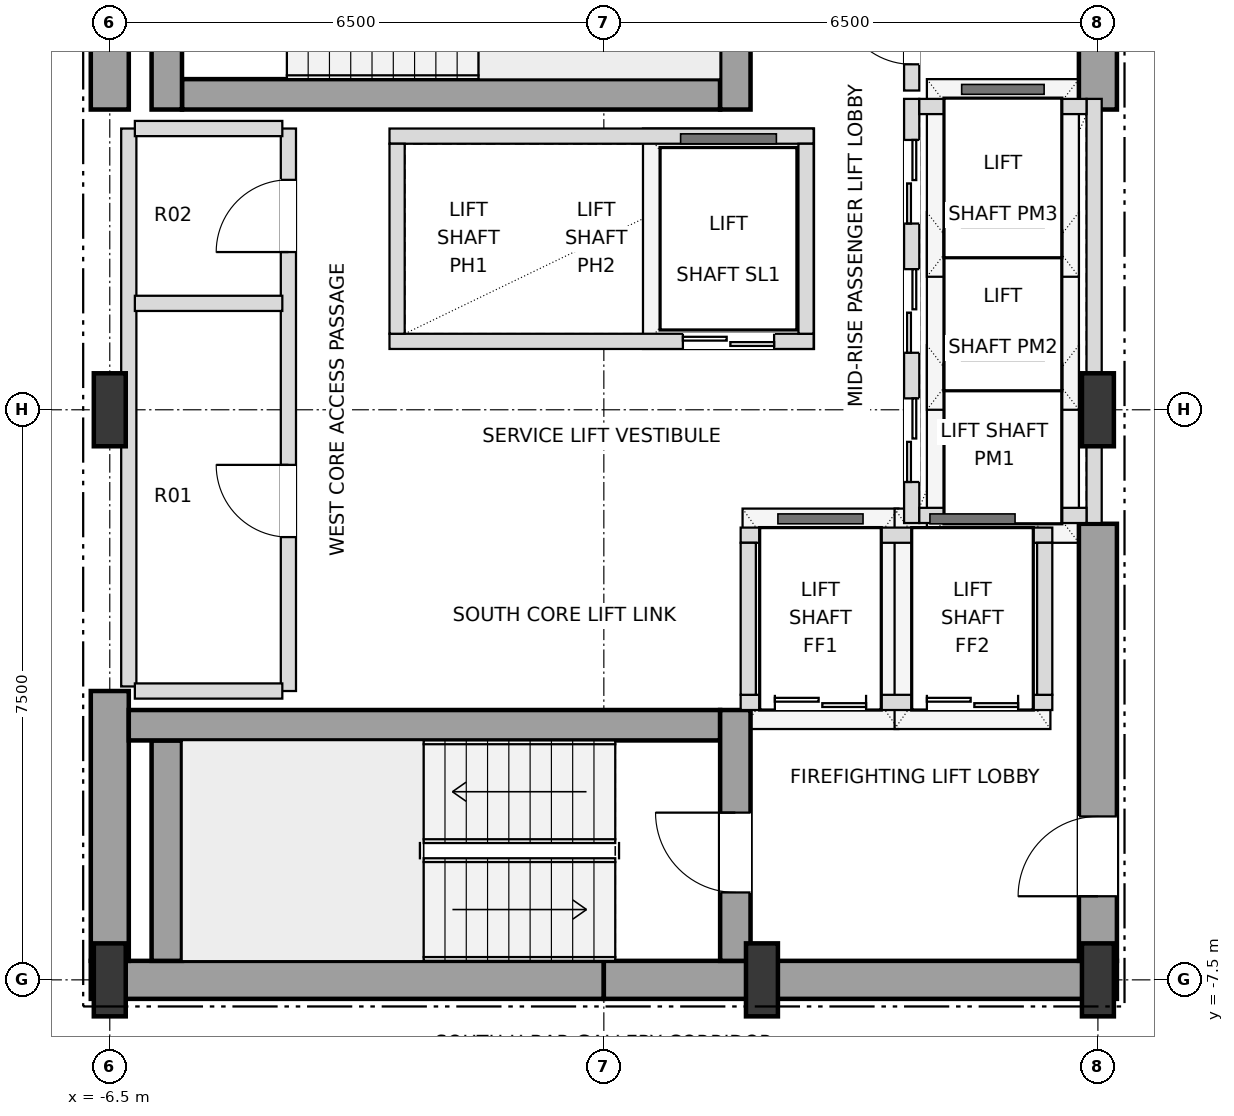
"""IFC4 building model, lengths in metres.
Left out: names, types, materials, properties, quantities, classifications, styles, units other than length and angle.
Written with IfcOpenShell. Run it as: python <this file> out.ifc"""

import sys

from ifc_helpers import new_model, si_unit, direction, frame, frame_2d, origin, origin_2d, place, context, subcontext, project, spatial, rectangle, i_section, extrude, element, fill, save


model = new_model("IFC4")
c1 = context("Model", 3, precision=1e-05, world=origin(), true_north=direction((0.0, 1.0)))
c2 = subcontext(c1, "Body", "Model", "MODEL_VIEW")
j1 = project(units=[si_unit("LENGTHUNIT", "METRE"), si_unit("PLANEANGLEUNIT", "RADIAN")], contexts=[c1])
p1 = place(None, origin())
s1 = spatial("IfcSite", under=j1, at=p1, CompositionType="ELEMENT")
p2 = place(p1, origin())
s2 = spatial("IfcBuilding", under=s1, at=p2, CompositionType="ELEMENT")
p3 = place(p2, frame((0.0, 0.0, 158.4)))
s3 = spatial("IfcBuildingStorey", under=s2, at=p3, CompositionType="ELEMENT", Elevation=158.4)
for number, where, z_axis, x_axis in (
    (1, (-6.5, -7.5, 0.0), (0.0, 0.0, 1.0), (1.0, 0.0, 0.0)),
    (2, (2.08, -7.5, 0.0), (0.0, 0.0, 1.0), (1.0, 0.0, 0.0)),
    (3, (6.5, -7.5, 0.0), (0.0, 0.0, 1.0), (1.0, 0.0, 0.0)),
    (4, (-6.5, 0.0, 0.0), (0.0, 0.0, 1.0), (1.0, 0.0, 0.0)),
    (5, (6.5, 0.0, 0.0), (0.0, 0.0, 1.0), (1.0, 0.0, 0.0)),
):
    element("IfcColumn", number, at=place(p3, frame(where, z_axis=z_axis, x_axis=x_axis)), inside=s3, PredefinedType="COLUMN", context=c2, shape_type="SweptSolid", body=[
        extrude(i_section(OverallWidth=0.42, OverallDepth=0.96, WebThickness=0.022, FlangeThickness=0.034, at=origin_2d()), origin(), (0.0, 0.0, 1.0), 3.6),
    ])
for number, where, z_axis, x_axis in (
    (6, (-6.75, -7.5, 0.0), (0.0, 0.0, 1.0), (1.0, 0.0, 0.0)),
    (7, (0.0, -7.5, 0.0), (0.0, 0.0, 1.0), (1.0, 0.0, 0.0)),
):
    element("IfcWall", number, at=place(p3, frame(where, z_axis=z_axis, x_axis=x_axis)), inside=s3, PredefinedType="SHEAR", context=c2, shape_type="SweptSolid", body=[
        extrude(rectangle(XDim=6.75, YDim=0.5, at=frame_2d((3.375, 0.0))), origin(), (0.0, 0.0, 1.0), 3.38),
    ])
p4 = place(p3, frame((-6.5, -7.25, 0.0), z_axis=(0.0, 0.0, 1.0), x_axis=(0.0, 1.0, 0.0)))
e8 = element("IfcWall", 8, at=p4, inside=s3, PredefinedType="SHEAR", context=c2, shape_type="SweptSolid", body=[
    extrude(rectangle(XDim=3.55, YDim=0.5, at=frame_2d((1.775, 0.0))), origin(), (0.0, 0.0, 1.0), 3.38),
])
p5 = place(p3, frame((-6.5, 3.95, 0.0), z_axis=(0.0, 0.0, 1.0), x_axis=(0.0, 1.0, 0.0)))
e9 = element("IfcWall", 9, at=p5, inside=s3, PredefinedType="SHEAR", context=c2, shape_type="SweptSolid", body=[
    extrude(rectangle(XDim=3.3, YDim=0.5, at=frame_2d((1.65, 0.0))), origin(), (0.0, 0.0, 1.0), 3.38),
])
p6 = place(p3, frame((6.5, -7.25, 0.0), z_axis=(0.0, 0.0, 1.0), x_axis=(0.0, 1.0, 0.0)))
e10 = element("IfcWall", 10, at=p6, inside=s3, PredefinedType="SHEAR", context=c2, shape_type="SweptSolid", body=[
    extrude(rectangle(XDim=5.75, YDim=0.5, at=frame_2d((2.875, 0.0))), origin(), (0.0, 0.0, 1.0), 3.38),
])
p7 = place(p6, frame((0.85, 0.0, 0.0)))
e11 = element("IfcOpeningElement", 11, at=p7, cuts=e10, PredefinedType="OPENING", context=c2, shape_type="SweptSolid", body=[
    extrude(rectangle(XDim=1.05, YDim=2.15, at=frame_2d((0.525, 1.075))), frame((0.0, 0.26, 0.0), z_axis=(0.0, -1.0, 0.0), x_axis=(1.0, 0.0, 0.0)), (0.0, 0.0, 1.0), 0.52),
])
p8 = place(p3, frame((6.5, 3.95, 0.0), z_axis=(0.0, 0.0, 1.0), x_axis=(0.0, 1.0, 0.0)))
e12 = element("IfcWall", 12, at=p8, inside=s3, PredefinedType="SHEAR", context=c2, shape_type="SweptSolid", body=[
    extrude(rectangle(XDim=3.3, YDim=0.5, at=frame_2d((1.65, 0.0))), origin(), (0.0, 0.0, 1.0), 3.38),
])
p9 = place(p3, frame((-5.75, -7.25, 0.0), z_axis=(0.0, 0.0, 1.0), x_axis=(0.0, 1.0, 0.0)))
e13 = element("IfcWall", 13, at=p9, inside=s3, PredefinedType="SHEAR", context=c2, shape_type="SweptSolid", body=[
    extrude(rectangle(XDim=2.9, YDim=0.4, at=frame_2d((1.45, 0.0))), origin(), (0.0, 0.0, 1.0), 3.38),
])
p10 = place(p3, frame((-6.25, -4.15, 0.0), z_axis=(0.0, 0.0, 1.0), x_axis=(1.0, 0.0, 0.0)))
e14 = element("IfcWall", 14, at=p10, inside=s3, PredefinedType="SHEAR", context=c2, shape_type="SweptSolid", body=[
    extrude(rectangle(XDim=7.78, YDim=0.4, at=frame_2d((3.89, 0.0))), origin(), (0.0, 0.0, 1.0), 3.38),
])
p11 = place(p3, frame((1.73, -7.25, 0.0), z_axis=(0.0, 0.0, 1.0), x_axis=(0.0, 1.0, 0.0)))
e15 = element("IfcWall", 15, at=p11, inside=s3, PredefinedType="SHEAR", context=c2, shape_type="SweptSolid", body=[
    extrude(rectangle(XDim=3.3, YDim=0.4, at=frame_2d((1.65, 0.0))), origin(), (0.0, 0.0, 1.0), 3.38),
])
p12 = place(p11, frame((0.9, 0.0, 0.0)))
e16 = element("IfcOpeningElement", 16, at=p12, cuts=e15, PredefinedType="OPENING", context=c2, shape_type="SweptSolid", body=[
    extrude(rectangle(XDim=1.05, YDim=2.15, at=frame_2d((0.525, 1.075))), frame((0.0, 0.21, 0.0), z_axis=(0.0, -1.0, 0.0), x_axis=(1.0, 0.0, 0.0)), (0.0, 0.0, 1.0), 0.42),
])
p13 = place(p3, frame((-5.55, 4.15, 0.0), z_axis=(0.0, 0.0, 1.0), x_axis=(1.0, 0.0, 0.0)))
e17 = element("IfcWall", 17, at=p13, inside=s3, PredefinedType="SHEAR", context=c2, shape_type="SweptSolid", body=[
    extrude(rectangle(XDim=7.08, YDim=0.4, at=frame_2d((3.54, 0.0))), origin(), (0.0, 0.0, 1.0), 3.38),
])
for number, where, z_axis, x_axis in (
    (18, (1.73, 3.95, 0.0), (0.0, 0.0, 1.0), (0.0, 1.0, 0.0)),
    (19, (-5.75, 3.95, 0.0), (0.0, 0.0, 1.0), (0.0, 1.0, 0.0)),
):
    element("IfcWall", number, at=place(p3, frame(where, z_axis=z_axis, x_axis=x_axis)), inside=s3, PredefinedType="SHEAR", context=c2, shape_type="SweptSolid", body=[
        extrude(rectangle(XDim=3.3, YDim=0.4, at=frame_2d((1.65, 0.0))), origin(), (0.0, 0.0, 1.0), 3.38),
    ])
p14 = place(p3, frame((4.05, -1.49, 0.0), z_axis=(0.0, 0.0, 1.0), x_axis=(0.0, 1.0, 0.0)))
e20 = element("IfcWall", 20, at=p14, inside=s3, PredefinedType="SOLIDWALL", context=c2, shape_type="SweptSolid", body=[
    extrude(rectangle(XDim=5.58, YDim=0.2, at=frame_2d((2.79, 0.0))), origin(), (0.0, 0.0, 1.0), 3.38),
])
p15 = place(p14, frame((0.54, 0.0, 0.0)))
e21 = element("IfcOpeningElement", 21, at=p15, cuts=e20, PredefinedType="OPENING", context=c2, shape_type="SweptSolid", body=[
    extrude(rectangle(XDim=1.1, YDim=2.15, at=frame_2d((0.55, 1.075))), frame((0.0, 0.11, 0.0), z_axis=(0.0, -1.0, 0.0), x_axis=(1.0, 0.0, 0.0)), (0.0, 0.0, 1.0), 0.22),
])
p16 = place(p14, frame((2.24, 0.0, 0.0)))
e22 = element("IfcOpeningElement", 22, at=p16, cuts=e20, PredefinedType="OPENING", context=c2, shape_type="SweptSolid", body=[
    extrude(rectangle(XDim=1.1, YDim=2.15, at=frame_2d((0.55, 1.075))), frame((0.0, 0.11, 0.0), z_axis=(0.0, -1.0, 0.0), x_axis=(1.0, 0.0, 0.0)), (0.0, 0.0, 1.0), 0.22),
])
p17 = place(p14, frame((3.94, 0.0, 0.0)))
e23 = element("IfcOpeningElement", 23, at=p17, cuts=e20, PredefinedType="OPENING", context=c2, shape_type="SweptSolid", body=[
    extrude(rectangle(XDim=1.1, YDim=2.15, at=frame_2d((0.55, 1.075))), frame((0.0, 0.11, 0.0), z_axis=(0.0, -1.0, 0.0), x_axis=(1.0, 0.0, 0.0)), (0.0, 0.0, 1.0), 0.22),
])
p18 = place(p3, frame((6.45, -1.49, 0.0), z_axis=(0.0, 0.0, 1.0), x_axis=(0.0, 1.0, 0.0)))
e24 = element("IfcWall", 24, at=p18, inside=s3, PredefinedType="SOLIDWALL", context=c2, shape_type="SweptSolid", body=[
    extrude(rectangle(XDim=5.58, YDim=0.2, at=frame_2d((2.79, 0.0))), origin(), (0.0, 0.0, 1.0), 2.816),
])
for number, where, z_axis, x_axis in (
    (25, (4.15, -1.39, 0.0), (0.0, 0.0, 1.0), (1.0, 0.0, 0.0)),
    (26, (4.15, 3.99, 0.0), (0.0, 0.0, 1.0), (1.0, 0.0, 0.0)),
):
    element("IfcWall", number, at=place(p3, frame(where, z_axis=z_axis, x_axis=x_axis)), inside=s3, PredefinedType="SOLIDWALL", context=c2, shape_type="SweptSolid", body=[
        extrude(rectangle(XDim=2.2, YDim=0.2, at=frame_2d((1.1, 0.0))), origin(), (0.0, 0.0, 1.0), 3.38),
    ])
p19 = place(p3, frame((-2.82, 0.9, 0.0), z_axis=(0.0, 0.0, 1.0), x_axis=(1.0, 0.0, 0.0)))
e27 = element("IfcWall", 27, at=p19, inside=s3, PredefinedType="SOLIDWALL", context=c2, shape_type="SweptSolid", body=[
    extrude(rectangle(XDim=5.58, YDim=0.2, at=frame_2d((2.79, 0.0))), origin(), (0.0, 0.0, 1.0), 3.38),
])
p20 = place(p19, frame((3.86, 0.0, 0.0)))
e28 = element("IfcOpeningElement", 28, at=p20, cuts=e27, PredefinedType="OPENING", context=c2, shape_type="SweptSolid", body=[
    extrude(rectangle(XDim=1.2, YDim=2.2, at=frame_2d((0.6, 1.1))), frame((0.0, 0.11, 0.0), z_axis=(0.0, -1.0, 0.0), x_axis=(1.0, 0.0, 0.0)), (0.0, 0.0, 1.0), 0.22),
])
p21 = place(p3, frame((-2.82, 3.6, 0.0), z_axis=(0.0, 0.0, 1.0), x_axis=(1.0, 0.0, 0.0)))
e29 = element("IfcWall", 29, at=p21, inside=s3, PredefinedType="SOLIDWALL", context=c2, shape_type="SweptSolid", body=[
    extrude(rectangle(XDim=5.58, YDim=0.2, at=frame_2d((2.79, 0.0))), origin(), (0.0, 0.0, 1.0), 3.38),
])
for number, where, z_axis, x_axis in (
    (30, (-2.72, 1.0, 0.0), (0.0, 0.0, 1.0), (0.0, 1.0, 0.0)),
    (31, (2.66, 1.0, 0.0), (0.0, 0.0, 1.0), (0.0, 1.0, 0.0)),
):
    element("IfcWall", number, at=place(p3, frame(where, z_axis=z_axis, x_axis=x_axis)), inside=s3, PredefinedType="SOLIDWALL", context=c2, shape_type="SweptSolid", body=[
        extrude(rectangle(XDim=2.5, YDim=0.2, at=frame_2d((1.25, 0.0))), origin(), (0.0, 0.0, 1.0), 3.38),
    ])
p22 = place(p3, frame((1.8, -3.85, 0.0), z_axis=(0.0, 0.0, 1.0), x_axis=(1.0, 0.0, 0.0)))
e32 = element("IfcWall", 32, at=p22, inside=s3, PredefinedType="SOLIDWALL", context=c2, shape_type="SweptSolid", body=[
    extrude(rectangle(XDim=4.1, YDim=0.2, at=frame_2d((2.05, 0.0))), origin(), (0.0, 0.0, 1.0), 3.38),
])
p23 = place(p22, frame((0.45, 0.0, 0.0)))
e33 = element("IfcOpeningElement", 33, at=p23, cuts=e32, PredefinedType="OPENING", context=c2, shape_type="SweptSolid", body=[
    extrude(rectangle(XDim=1.2, YDim=2.2, at=frame_2d((0.6, 1.1))), frame((0.0, 0.11, 0.0), z_axis=(0.0, -1.0, 0.0), x_axis=(1.0, 0.0, 0.0)), (0.0, 0.0, 1.0), 0.22),
])
p24 = place(p22, frame((2.45, 0.0, 0.0)))
e34 = element("IfcOpeningElement", 34, at=p24, cuts=e32, PredefinedType="OPENING", context=c2, shape_type="SweptSolid", body=[
    extrude(rectangle(XDim=1.2, YDim=2.2, at=frame_2d((0.6, 1.1))), frame((0.0, 0.11, 0.0), z_axis=(0.0, -1.0, 0.0), x_axis=(1.0, 0.0, 0.0)), (0.0, 0.0, 1.0), 0.22),
])
p25 = place(p3, frame((1.8, -1.65, 0.0), z_axis=(0.0, 0.0, 1.0), x_axis=(1.0, 0.0, 0.0)))
e35 = element("IfcWall", 35, at=p25, inside=s3, PredefinedType="SOLIDWALL", context=c2, shape_type="SweptSolid", body=[
    extrude(rectangle(XDim=4.1, YDim=0.2, at=frame_2d((2.05, 0.0))), origin(), (0.0, 0.0, 1.0), 3.38),
])
for number, where, z_axis, x_axis in (
    (36, (1.9, -3.75, 0.0), (0.0, 0.0, 1.0), (0.0, 1.0, 0.0)),
    (37, (5.8, -3.75, 0.0), (0.0, 0.0, 1.0), (0.0, 1.0, 0.0)),
):
    element("IfcWall", number, at=place(p3, frame(where, z_axis=z_axis, x_axis=x_axis)), inside=s3, PredefinedType="SOLIDWALL", context=c2, shape_type="SweptSolid", body=[
        extrude(rectangle(XDim=2.0, YDim=0.2, at=frame_2d((1.0, 0.0))), origin(), (0.0, 0.0, 1.0), 3.38),
    ])
p26 = place(p3, frame((-6.25, -3.64, 0.0), z_axis=(0.0, 0.0, 1.0), x_axis=(0.0, 1.0, 0.0)))
e38 = element("IfcWall", 38, at=p26, inside=s3, PredefinedType="SOLIDWALL", context=c2, shape_type="SweptSolid", body=[
    extrude(rectangle(XDim=7.34, YDim=0.2, at=frame_2d((3.67, 0.0))), origin(), (0.0, 0.0, 1.0), 3.38),
])
p27 = place(p3, frame((-4.15, -3.7, 0.0), z_axis=(0.0, 0.0, 1.0), x_axis=(0.0, 1.0, 0.0)))
e39 = element("IfcWall", 39, at=p27, inside=s3, PredefinedType="SOLIDWALL", context=c2, shape_type="SweptSolid", body=[
    extrude(rectangle(XDim=7.4, YDim=0.2, at=frame_2d((3.7, 0.0))), origin(), (0.0, 0.0, 1.0), 3.38),
])
p28 = place(p27, frame((2.025, 0.0, 0.0)))
e40 = element("IfcOpeningElement", 40, at=p28, cuts=e39, PredefinedType="OPENING", context=c2, shape_type="SweptSolid", body=[
    extrude(rectangle(XDim=0.95, YDim=2.15, at=frame_2d((0.475, 1.075))), frame((0.0, 0.11, 0.0), z_axis=(0.0, -1.0, 0.0), x_axis=(1.0, 0.0, 0.0)), (0.0, 0.0, 1.0), 0.22),
])
p29 = place(p27, frame((5.775, 0.0, 0.0)))
e41 = element("IfcOpeningElement", 41, at=p29, cuts=e39, PredefinedType="OPENING", context=c2, shape_type="SweptSolid", body=[
    extrude(rectangle(XDim=0.95, YDim=2.15, at=frame_2d((0.475, 1.075))), frame((0.0, 0.11, 0.0), z_axis=(0.0, -1.0, 0.0), x_axis=(1.0, 0.0, 0.0)), (0.0, 0.0, 1.0), 0.22),
])
p30 = place(p3, frame((4.05, 4.2, 0.0), z_axis=(0.0, 0.0, 1.0), x_axis=(0.0, 1.0, 0.0)))
e42 = element("IfcWall", 42, at=p30, inside=s3, PredefinedType="SOLIDWALL", context=c2, shape_type="SweptSolid", body=[
    extrude(rectangle(XDim=1.65, YDim=0.2, at=frame_2d((0.825, 0.0))), origin(), (0.0, 0.0, 1.0), 3.38),
])
p31 = place(p30, frame((0.345, 0.0, 0.0)))
e43 = element("IfcOpeningElement", 43, at=p31, cuts=e42, PredefinedType="OPENING", context=c2, shape_type="SweptSolid", body=[
    extrude(rectangle(XDim=0.95, YDim=2.15, at=frame_2d((0.475, 1.075))), frame((0.0, 0.11, 0.0), z_axis=(0.0, -1.0, 0.0), x_axis=(1.0, 0.0, 0.0)), (0.0, 0.0, 1.0), 0.22),
])
for number, where, z_axis, x_axis in (
    (44, (-6.17, -3.7, 0.0), (0.0, 0.0, 1.0), (1.0, 0.0, 0.0)),
    (45, (-6.17, 1.4, 0.0), (0.0, 0.0, 1.0), (1.0, 0.0, 0.0)),
    (46, (-6.17, 3.7, 0.0), (0.0, 0.0, 1.0), (1.0, 0.0, 0.0)),
):
    element("IfcWall", number, at=place(p3, frame(where, z_axis=z_axis, x_axis=x_axis)), inside=s3, PredefinedType="SOLIDWALL", context=c2, shape_type="SweptSolid", body=[
        extrude(rectangle(XDim=1.94, YDim=0.2, at=frame_2d((0.97, 0.0))), origin(), (0.0, 0.0, 1.0), 3.38),
    ])
p32 = place(p7, origin())
e47 = element("IfcDoor", 47, at=p32, inside=s3, OperationType="SINGLE_SWING_LEFT", PredefinedType="DOOR", context=c2, shape_type="SweptSolid", body=[
    extrude(rectangle(XDim=1.05, YDim=2.15, at=frame_2d((0.525, 1.075))), frame((0.0, 0.025, 0.0), z_axis=(0.0, -1.0, 0.0), x_axis=(1.0, 0.0, 0.0)), (0.0, 0.0, 1.0), 0.05),
])
fill(e11, e47)
p33 = place(p12, origin())
e48 = element("IfcDoor", 48, at=p33, inside=s3, OperationType="SINGLE_SWING_RIGHT", PredefinedType="DOOR", context=c2, shape_type="SweptSolid", body=[
    extrude(rectangle(XDim=1.05, YDim=2.15, at=frame_2d((0.525, 1.075))), frame((0.0, 0.025, 0.0), z_axis=(0.0, -1.0, 0.0), x_axis=(1.0, 0.0, 0.0)), (0.0, 0.0, 1.0), 0.05),
])
fill(e16, e48)
p34 = place(p15, origin())
e49 = element("IfcDoor", 49, at=p34, inside=s3, OperationType="DOUBLE_DOOR_SLIDING", PredefinedType="DOOR", context=c2, shape_type="SweptSolid", body=[
    extrude(rectangle(XDim=1.1, YDim=2.15, at=frame_2d((0.55, 1.075))), frame((0.0, 0.025, 0.0), z_axis=(0.0, -1.0, 0.0), x_axis=(1.0, 0.0, 0.0)), (0.0, 0.0, 1.0), 0.05),
])
fill(e21, e49)
p35 = place(p16, origin())
e50 = element("IfcDoor", 50, at=p35, inside=s3, OperationType="DOUBLE_DOOR_SLIDING", PredefinedType="DOOR", context=c2, shape_type="SweptSolid", body=[
    extrude(rectangle(XDim=1.1, YDim=2.15, at=frame_2d((0.55, 1.075))), frame((0.0, 0.025, 0.0), z_axis=(0.0, -1.0, 0.0), x_axis=(1.0, 0.0, 0.0)), (0.0, 0.0, 1.0), 0.05),
])
fill(e22, e50)
p36 = place(p17, origin())
e51 = element("IfcDoor", 51, at=p36, inside=s3, OperationType="DOUBLE_DOOR_SLIDING", PredefinedType="DOOR", context=c2, shape_type="SweptSolid", body=[
    extrude(rectangle(XDim=1.1, YDim=2.15, at=frame_2d((0.55, 1.075))), frame((0.0, 0.025, 0.0), z_axis=(0.0, -1.0, 0.0), x_axis=(1.0, 0.0, 0.0)), (0.0, 0.0, 1.0), 0.05),
])
fill(e23, e51)
p37 = place(p20, origin())
e52 = element("IfcDoor", 52, at=p37, inside=s3, OperationType="DOUBLE_DOOR_SLIDING", PredefinedType="DOOR", context=c2, shape_type="SweptSolid", body=[
    extrude(rectangle(XDim=1.2, YDim=2.2, at=frame_2d((0.6, 1.1))), frame((0.0, 0.025, 0.0), z_axis=(0.0, -1.0, 0.0), x_axis=(1.0, 0.0, 0.0)), (0.0, 0.0, 1.0), 0.05),
])
fill(e28, e52)
p38 = place(p23, origin())
e53 = element("IfcDoor", 53, at=p38, inside=s3, OperationType="DOUBLE_DOOR_SLIDING", PredefinedType="DOOR", context=c2, shape_type="SweptSolid", body=[
    extrude(rectangle(XDim=1.2, YDim=2.2, at=frame_2d((0.6, 1.1))), frame((0.0, 0.025, 0.0), z_axis=(0.0, -1.0, 0.0), x_axis=(1.0, 0.0, 0.0)), (0.0, 0.0, 1.0), 0.05),
])
fill(e33, e53)
p39 = place(p24, origin())
e54 = element("IfcDoor", 54, at=p39, inside=s3, OperationType="DOUBLE_DOOR_SLIDING", PredefinedType="DOOR", context=c2, shape_type="SweptSolid", body=[
    extrude(rectangle(XDim=1.2, YDim=2.2, at=frame_2d((0.6, 1.1))), frame((0.0, 0.025, 0.0), z_axis=(0.0, -1.0, 0.0), x_axis=(1.0, 0.0, 0.0)), (0.0, 0.0, 1.0), 0.05),
])
fill(e34, e54)
p40 = place(p28, origin())
e55 = element("IfcDoor", 55, at=p40, inside=s3, OperationType="SINGLE_SWING_RIGHT", PredefinedType="DOOR", context=c2, shape_type="SweptSolid", body=[
    extrude(rectangle(XDim=0.95, YDim=2.15, at=frame_2d((0.475, 1.075))), frame((0.0, 0.025, 0.0), z_axis=(0.0, -1.0, 0.0), x_axis=(1.0, 0.0, 0.0)), (0.0, 0.0, 1.0), 0.05),
])
fill(e40, e55)
p41 = place(p29, origin())
e56 = element("IfcDoor", 56, at=p41, inside=s3, OperationType="SINGLE_SWING_LEFT", PredefinedType="DOOR", context=c2, shape_type="SweptSolid", body=[
    extrude(rectangle(XDim=0.95, YDim=2.15, at=frame_2d((0.475, 1.075))), frame((0.0, 0.025, 0.0), z_axis=(0.0, -1.0, 0.0), x_axis=(1.0, 0.0, 0.0)), (0.0, 0.0, 1.0), 0.05),
])
fill(e41, e56)
p42 = place(p31, origin())
e57 = element("IfcDoor", 57, at=p42, inside=s3, OperationType="SINGLE_SWING_RIGHT", PredefinedType="DOOR", context=c2, shape_type="SweptSolid", body=[
    extrude(rectangle(XDim=0.95, YDim=2.15, at=frame_2d((0.475, 1.075))), frame((0.0, 0.025, 0.0), z_axis=(0.0, -1.0, 0.0), x_axis=(1.0, 0.0, 0.0)), (0.0, 0.0, 1.0), 0.05),
])
fill(e43, e57)
save(model, sys.argv[1])
